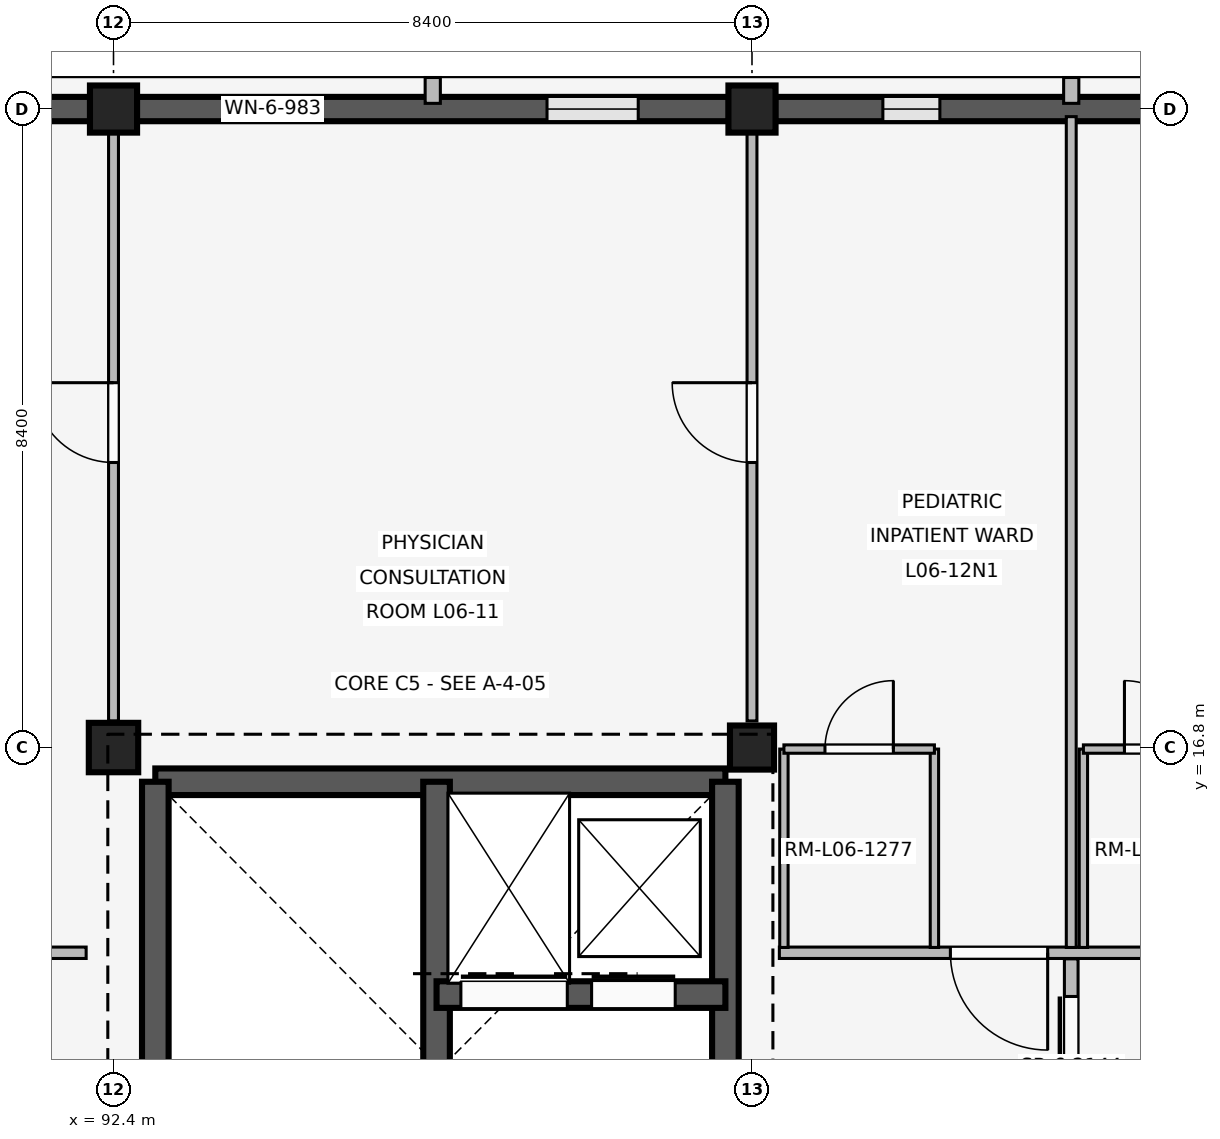
"""IFC4 building model, lengths in metres.
Left out: names, types, materials, properties, quantities, classifications, styles, units other than length and angle.
Written with IfcOpenShell. Run it as: python <this file> out.ifc"""

import sys

from ifc_helpers import new_model, si_unit, direction, frame, frame_2d, origin, origin_2d, place, context, subcontext, project, spatial, rectangle, extrude, element, fill, save


model = new_model("IFC4")
c1 = context("Model", 3, precision=1e-05, world=origin(), true_north=direction((0.0, 1.0)))
c2 = subcontext(c1, "Body", "Model", "MODEL_VIEW")
j1 = project(units=[si_unit("LENGTHUNIT", "METRE"), si_unit("PLANEANGLEUNIT", "RADIAN")], contexts=[c1])
p1 = place(None, origin())
s1 = spatial("IfcSite", under=j1, at=p1, CompositionType="ELEMENT")
p2 = place(p1, origin())
s2 = spatial("IfcBuilding", under=s1, at=p2, CompositionType="ELEMENT")
p3 = place(p2, frame((0.0, 0.0, 24.6)))
s3 = spatial("IfcBuildingStorey", under=s2, at=p3, CompositionType="ELEMENT", Elevation=24.6)
p4 = place(p3, frame((92.4, 16.8, 0.0), z_axis=(0.0, 0.0, 1.0), x_axis=(1.0, 0.0, 0.0)))
e1 = element("IfcColumn", 1, at=p4, inside=s3, PredefinedType="COLUMN", context=c2, shape_type="SweptSolid", body=[
    extrude(rectangle(XDim=0.65, YDim=0.65, at=origin_2d()), origin(), (0.0, 0.0, 1.0), 4.2),
])
p5 = place(p3, frame((92.4, 25.2, 0.0), z_axis=(0.0, 0.0, 1.0), x_axis=(1.0, 0.0, 0.0)))
e2 = element("IfcColumn", 2, at=p5, inside=s3, PredefinedType="COLUMN", context=c2, shape_type="SweptSolid", body=[
    extrude(rectangle(XDim=0.62, YDim=0.62, at=origin_2d()), origin(), (0.0, 0.0, 1.0), 4.2),
])
p6 = place(p3, frame((100.8, 16.8, 0.0), z_axis=(0.0, 0.0, 1.0), x_axis=(1.0, 0.0, 0.0)))
e3 = element("IfcColumn", 3, at=p6, inside=s3, PredefinedType="COLUMN", context=c2, shape_type="SweptSolid", body=[
    extrude(rectangle(XDim=0.58, YDim=0.58, at=origin_2d()), origin(), (0.0, 0.0, 1.0), 4.2),
])
p7 = place(p3, frame((100.8, 25.2, 0.0), z_axis=(0.0, 0.0, 1.0), x_axis=(1.0, 0.0, 0.0)))
e4 = element("IfcColumn", 4, at=p7, inside=s3, PredefinedType="COLUMN", context=c2, shape_type="SweptSolid", body=[
    extrude(rectangle(XDim=0.62, YDim=0.62, at=origin_2d()), origin(), (0.0, 0.0, 1.0), 4.2),
])
p8 = place(p3, frame((84.305, 25.2, 0.0), z_axis=(0.0, 0.0, 1.0), x_axis=(1.0, 0.0, 0.0)))
e5 = element("IfcWall", 5, at=p8, inside=s3, PredefinedType="SOLIDWALL", context=c2, shape_type="SweptSolid", body=[
    extrude(rectangle(XDim=7.79, YDim=0.32, at=frame_2d((3.895, 0.0))), origin(), (0.0, 0.0, 1.0), 3.34),
])
p9 = place(p8, frame((1.117, 0.0, 0.85)))
e6 = element("IfcOpeningElement", 6, at=p9, cuts=e5, PredefinedType="OPENING", context=c2, shape_type="SweptSolid", body=[
    extrude(rectangle(XDim=1.35, YDim=1.55, at=frame_2d((0.675, 0.775))), frame((0.0, 0.17, 0.0), z_axis=(0.0, -1.0, 0.0), x_axis=(1.0, 0.0, 0.0)), (0.0, 0.0, 1.0), 0.34),
])
p10 = place(p8, frame((5.323, 0.0, 0.85)))
e7 = element("IfcOpeningElement", 7, at=p10, cuts=e5, PredefinedType="OPENING", context=c2, shape_type="SweptSolid", body=[
    extrude(rectangle(XDim=1.35, YDim=1.55, at=frame_2d((0.675, 0.775))), frame((0.0, 0.17, 0.0), z_axis=(0.0, -1.0, 0.0), x_axis=(1.0, 0.0, 0.0)), (0.0, 0.0, 1.0), 0.34),
])
p11 = place(p3, frame((92.705, 25.2, 0.0), z_axis=(0.0, 0.0, 1.0), x_axis=(1.0, 0.0, 0.0)))
e8 = element("IfcWall", 8, at=p11, inside=s3, PredefinedType="SOLIDWALL", context=c2, shape_type="SweptSolid", body=[
    extrude(rectangle(XDim=7.79, YDim=0.32, at=frame_2d((3.895, 0.0))), origin(), (0.0, 0.0, 1.0), 3.34),
])
p12 = place(p11, frame((1.192, 0.0, 0.85)))
e9 = element("IfcOpeningElement", 9, at=p12, cuts=e8, PredefinedType="OPENING", context=c2, shape_type="SweptSolid", body=[
    extrude(rectangle(XDim=1.2, YDim=1.55, at=frame_2d((0.6, 0.775))), frame((0.0, 0.17, 0.0), z_axis=(0.0, -1.0, 0.0), x_axis=(1.0, 0.0, 0.0)), (0.0, 0.0, 1.0), 0.34),
])
p13 = place(p11, frame((5.398, 0.0, 0.85)))
e10 = element("IfcOpeningElement", 10, at=p13, cuts=e8, PredefinedType="OPENING", context=c2, shape_type="SweptSolid", body=[
    extrude(rectangle(XDim=1.2, YDim=1.55, at=frame_2d((0.6, 0.775))), frame((0.0, 0.17, 0.0), z_axis=(0.0, -1.0, 0.0), x_axis=(1.0, 0.0, 0.0)), (0.0, 0.0, 1.0), 0.34),
])
p14 = place(p3, frame((96.6, 25.275, 0.0), z_axis=(0.0, 0.0, 1.0), x_axis=(0.0, 1.0, 0.0)))
e11 = element("IfcWall", 11, at=p14, inside=s3, PredefinedType="ELEMENTEDWALL", context=c2, shape_type="SweptSolid", body=[
    extrude(rectangle(XDim=0.34, YDim=0.2, at=frame_2d((0.17, 0.0))), origin(), (0.0, 0.0, 1.0), 3.32),
])
p15 = place(p3, frame((101.105, 25.2, 0.0), z_axis=(0.0, 0.0, 1.0), x_axis=(1.0, 0.0, 0.0)))
e12 = element("IfcWall", 12, at=p15, inside=s3, PredefinedType="SOLIDWALL", context=c2, shape_type="SweptSolid", body=[
    extrude(rectangle(XDim=7.79, YDim=0.32, at=frame_2d((3.895, 0.0))), origin(), (0.0, 0.0, 1.0), 3.34),
])
p16 = place(p15, frame((1.417, 0.0, 0.85)))
e13 = element("IfcOpeningElement", 13, at=p16, cuts=e12, PredefinedType="OPENING", context=c2, shape_type="SweptSolid", body=[
    extrude(rectangle(XDim=0.75, YDim=1.85, at=frame_2d((0.375, 0.925))), frame((0.0, 0.17, 0.0), z_axis=(0.0, -1.0, 0.0), x_axis=(1.0, 0.0, 0.0)), (0.0, 0.0, 1.0), 0.34),
])
p17 = place(p15, frame((5.623, 0.0, 0.85)))
e14 = element("IfcOpeningElement", 14, at=p17, cuts=e12, PredefinedType="OPENING", context=c2, shape_type="SweptSolid", body=[
    extrude(rectangle(XDim=0.75, YDim=1.85, at=frame_2d((0.375, 0.925))), frame((0.0, 0.17, 0.0), z_axis=(0.0, -1.0, 0.0), x_axis=(1.0, 0.0, 0.0)), (0.0, 0.0, 1.0), 0.34),
])
p18 = place(p3, frame((105.0, 25.275, 0.0), z_axis=(0.0, 0.0, 1.0), x_axis=(0.0, 1.0, 0.0)))
e15 = element("IfcWall", 15, at=p18, inside=s3, PredefinedType="ELEMENTEDWALL", context=c2, shape_type="SweptSolid", body=[
    extrude(rectangle(XDim=0.34, YDim=0.2, at=frame_2d((0.17, 0.0))), origin(), (0.0, 0.0, 1.0), 3.32),
])
p19 = place(p3, frame((92.95, 16.35, 0.0), z_axis=(0.0, 0.0, 1.0), x_axis=(1.0, 0.0, 0.0)))
e16 = element("IfcWall", 16, at=p19, inside=s3, PredefinedType="SHEAR", context=c2, shape_type="SweptSolid", body=[
    extrude(rectangle(XDim=7.5, YDim=0.35, at=frame_2d((3.75, 0.0))), origin(), (0.0, 0.0, 1.0), 3.92),
])
p20 = place(p3, frame((92.95, 8.8, 0.0), z_axis=(0.0, 0.0, 1.0), x_axis=(0.0, 1.0, 0.0)))
e17 = element("IfcWall", 17, at=p20, inside=s3, PredefinedType="SHEAR", context=c2, shape_type="SweptSolid", body=[
    extrude(rectangle(XDim=7.55, YDim=0.35, at=frame_2d((3.775, 0.0))), origin(), (0.0, 0.0, 1.0), 3.92),
])
p21 = place(p20, frame((0.28, 0.0, 0.0)))
e18 = element("IfcOpeningElement", 18, at=p21, cuts=e17, PredefinedType="OPENING", context=c2, shape_type="SweptSolid", body=[
    extrude(rectangle(XDim=1.0, YDim=2.15, at=frame_2d((0.5, 1.075))), frame((0.0, 0.185, 0.0), z_axis=(0.0, -1.0, 0.0), x_axis=(1.0, 0.0, 0.0)), (0.0, 0.0, 1.0), 0.37),
])
p22 = place(p3, frame((100.45, 8.8, 0.0), z_axis=(0.0, 0.0, 1.0), x_axis=(0.0, 1.0, 0.0)))
e19 = element("IfcWall", 19, at=p22, inside=s3, PredefinedType="SHEAR", context=c2, shape_type="SweptSolid", body=[
    extrude(rectangle(XDim=7.55, YDim=0.35, at=frame_2d((3.775, 0.0))), origin(), (0.0, 0.0, 1.0), 3.92),
])
p23 = place(p22, frame((2.4, 0.0, 0.0)))
e20 = element("IfcOpeningElement", 20, at=p23, cuts=e19, PredefinedType="OPENING", context=c2, shape_type="SweptSolid", body=[
    extrude(rectangle(XDim=1.2, YDim=2.2, at=frame_2d((0.6, 1.1))), frame((0.0, 0.185, 0.0), z_axis=(0.0, -1.0, 0.0), x_axis=(1.0, 0.0, 0.0)), (0.0, 0.0, 1.0), 0.37),
])
p24 = place(p3, frame((96.65, 8.8, 0.0), z_axis=(0.0, 0.0, 1.0), x_axis=(0.0, 1.0, 0.0)))
e21 = element("IfcWall", 21, at=p24, inside=s3, PredefinedType="SHEAR", context=c2, shape_type="SweptSolid", body=[
    extrude(rectangle(XDim=7.55, YDim=0.35, at=frame_2d((3.775, 0.0))), origin(), (0.0, 0.0, 1.0), 3.92),
])
p25 = place(p24, frame((0.28, 0.0, 0.0)))
e22 = element("IfcOpeningElement", 22, at=p25, cuts=e21, PredefinedType="OPENING", context=c2, shape_type="SweptSolid", body=[
    extrude(rectangle(XDim=1.0, YDim=2.15, at=frame_2d((0.5, 1.075))), frame((0.0, 0.185, 0.0), z_axis=(0.0, -1.0, 0.0), x_axis=(1.0, 0.0, 0.0)), (0.0, 0.0, 1.0), 0.37),
])
p26 = place(p3, frame((96.65, 13.55, 0.0), z_axis=(0.0, 0.0, 1.0), x_axis=(1.0, 0.0, 0.0)))
e23 = element("IfcWall", 23, at=p26, inside=s3, PredefinedType="SHEAR", context=c2, shape_type="SweptSolid", body=[
    extrude(rectangle(XDim=3.8, YDim=0.35, at=frame_2d((1.9, 0.0))), origin(), (0.0, 0.0, 1.0), 3.92),
])
p27 = place(p26, frame((0.32, 0.0, 0.0)))
e24 = element("IfcOpeningElement", 24, at=p27, cuts=e23, PredefinedType="OPENING", context=c2, shape_type="SweptSolid", body=[
    extrude(rectangle(XDim=1.4, YDim=2.25, at=frame_2d((0.7, 1.125))), frame((0.0, 0.185, 0.0), z_axis=(0.0, -1.0, 0.0), x_axis=(1.0, 0.0, 0.0)), (0.0, 0.0, 1.0), 0.37),
])
p28 = place(p26, frame((2.04, 0.0, 0.0)))
e25 = element("IfcOpeningElement", 25, at=p28, cuts=e23, PredefinedType="OPENING", context=c2, shape_type="SweptSolid", body=[
    extrude(rectangle(XDim=1.1, YDim=2.15, at=frame_2d((0.55, 1.075))), frame((0.0, 0.185, 0.0), z_axis=(0.0, -1.0, 0.0), x_axis=(1.0, 0.0, 0.0)), (0.0, 0.0, 1.0), 0.37),
])
p29 = place(p3, frame((92.04, 14.1, 0.0), z_axis=(0.0, 0.0, 1.0), x_axis=(-1.0, 0.0, 0.0)))
e26 = element("IfcWall", 26, at=p29, inside=s3, PredefinedType="PARTITIONING", context=c2, shape_type="SweptSolid", body=[
    extrude(rectangle(XDim=7.96, YDim=0.15, at=frame_2d((3.98, 0.0))), origin(), (0.0, 0.0, 1.0), 3.32),
])
p30 = place(p29, frame((3.355, 0.0, 0.0)))
e27 = element("IfcOpeningElement", 27, at=p30, cuts=e26, PredefinedType="OPENING", context=c2, shape_type="SweptSolid", body=[
    extrude(rectangle(XDim=1.25, YDim=2.2, at=frame_2d((0.625, 1.1))), frame((0.0, 0.085, 0.0), z_axis=(0.0, -1.0, 0.0), x_axis=(1.0, 0.0, 0.0)), (0.0, 0.0, 1.0), 0.17),
])
p31 = place(p3, frame((92.4, 17.15, 0.0), z_axis=(0.0, 0.0, 1.0), x_axis=(0.0, 1.0, 0.0)))
e28 = element("IfcWall", 28, at=p31, inside=s3, PredefinedType="PARTITIONING", context=c2, shape_type="SweptSolid", body=[
    extrude(rectangle(XDim=7.91, YDim=0.13, at=frame_2d((3.955, 0.0))), origin(), (0.0, 0.0, 1.0), 3.32),
])
p32 = place(p31, frame((3.4, 0.0, 0.0)))
e29 = element("IfcOpeningElement", 29, at=p32, cuts=e28, PredefinedType="OPENING", context=c2, shape_type="SweptSolid", body=[
    extrude(rectangle(XDim=1.05, YDim=2.2, at=frame_2d((0.525, 1.1))), frame((0.0, 0.075, 0.0), z_axis=(0.0, -1.0, 0.0), x_axis=(1.0, 0.0, 0.0)), (0.0, 0.0, 1.0), 0.15),
])
p33 = place(p3, frame((100.8, 17.15, 0.0), z_axis=(0.0, 0.0, 1.0), x_axis=(0.0, 1.0, 0.0)))
e30 = element("IfcWall", 30, at=p33, inside=s3, PredefinedType="PARTITIONING", context=c2, shape_type="SweptSolid", body=[
    extrude(rectangle(XDim=7.91, YDim=0.13, at=frame_2d((3.955, 0.0))), origin(), (0.0, 0.0, 1.0), 3.32),
])
p34 = place(p33, frame((3.4, 0.0, 0.0)))
e31 = element("IfcOpeningElement", 31, at=p34, cuts=e30, PredefinedType="OPENING", context=c2, shape_type="SweptSolid", body=[
    extrude(rectangle(XDim=1.05, YDim=2.2, at=frame_2d((0.525, 1.1))), frame((0.0, 0.075, 0.0), z_axis=(0.0, -1.0, 0.0), x_axis=(1.0, 0.0, 0.0)), (0.0, 0.0, 1.0), 0.15),
])
p35 = place(p3, frame((109.12, 14.1, 0.0), z_axis=(0.0, 0.0, 1.0), x_axis=(-1.0, 0.0, 0.0)))
e32 = element("IfcWall", 32, at=p35, inside=s3, PredefinedType="PARTITIONING", context=c2, shape_type="SweptSolid", body=[
    extrude(rectangle(XDim=7.96, YDim=0.15, at=frame_2d((3.98, 0.0))), origin(), (0.0, 0.0, 1.0), 3.32),
])
p36 = place(p35, frame((0.73, 0.0, 0.0)))
e33 = element("IfcOpeningElement", 33, at=p36, cuts=e32, PredefinedType="OPENING", context=c2, shape_type="SweptSolid", body=[
    extrude(rectangle(XDim=1.28, YDim=2.2, at=frame_2d((0.64, 1.1))), frame((0.0, 0.085, 0.0), z_axis=(0.0, -1.0, 0.0), x_axis=(1.0, 0.0, 0.0)), (0.0, 0.0, 1.0), 0.17),
])
p37 = place(p35, frame((4.43, 0.0, 0.0)))
e34 = element("IfcOpeningElement", 34, at=p37, cuts=e32, PredefinedType="OPENING", context=c2, shape_type="SweptSolid", body=[
    extrude(rectangle(XDim=1.28, YDim=2.2, at=frame_2d((0.64, 1.1))), frame((0.0, 0.085, 0.0), z_axis=(0.0, -1.0, 0.0), x_axis=(1.0, 0.0, 0.0)), (0.0, 0.0, 1.0), 0.17),
])
p38 = place(p3, frame((105.0, 14.17, 0.0), z_axis=(0.0, 0.0, 1.0), x_axis=(0.0, 1.0, 0.0)))
e35 = element("IfcWall", 35, at=p38, inside=s3, PredefinedType="PARTITIONING", context=c2, shape_type="SweptSolid", body=[
    extrude(rectangle(XDim=10.93, YDim=0.13, at=frame_2d((5.465, 0.0))), origin(), (0.0, 0.0, 1.0), 3.32),
])
for number, where, z_axis, x_axis in (
    (36, (101.22, 14.17, 0.0), (0.0, 0.0, 1.0), (0.0, 1.0, 0.0)),
    (37, (103.2, 14.17, 0.0), (0.0, 0.0, 1.0), (0.0, 1.0, 0.0)),
):
    element("IfcWall", number, at=place(p3, frame(where, z_axis=z_axis, x_axis=x_axis)), inside=s3, PredefinedType="PARTITIONING", context=c2, shape_type="SweptSolid", body=[
        extrude(rectangle(XDim=2.61, YDim=0.11, at=frame_2d((1.305, 0.0))), origin(), (0.0, 0.0, 1.0), 3.32),
    ])
p39 = place(p3, frame((101.22, 16.78, 0.0), z_axis=(0.0, 0.0, 1.0), x_axis=(1.0, 0.0, 0.0)))
e38 = element("IfcWall", 38, at=p39, inside=s3, PredefinedType="PARTITIONING", context=c2, shape_type="SweptSolid", body=[
    extrude(rectangle(XDim=1.98, YDim=0.11, at=frame_2d((0.99, 0.0))), origin(), (0.0, 0.0, 1.0), 3.32),
])
p40 = place(p39, frame((0.54, 0.0, 0.0)))
e39 = element("IfcOpeningElement", 39, at=p40, cuts=e38, PredefinedType="OPENING", context=c2, shape_type="SweptSolid", body=[
    extrude(rectangle(XDim=0.9, YDim=2.1, at=frame_2d((0.45, 1.05))), frame((0.0, 0.065, 0.0), z_axis=(0.0, -1.0, 0.0), x_axis=(1.0, 0.0, 0.0)), (0.0, 0.0, 1.0), 0.13),
])
p41 = place(p3, frame((105.16, 14.17, 0.0), z_axis=(0.0, 0.0, 1.0), x_axis=(0.0, 1.0, 0.0)))
e40 = element("IfcWall", 40, at=p41, inside=s3, PredefinedType="PARTITIONING", context=c2, shape_type="SweptSolid", body=[
    extrude(rectangle(XDim=2.61, YDim=0.11, at=frame_2d((1.305, 0.0))), origin(), (0.0, 0.0, 1.0), 3.32),
])
p42 = place(p3, frame((105.16, 16.78, 0.0), z_axis=(0.0, 0.0, 1.0), x_axis=(1.0, 0.0, 0.0)))
e41 = element("IfcWall", 41, at=p42, inside=s3, PredefinedType="PARTITIONING", context=c2, shape_type="SweptSolid", body=[
    extrude(rectangle(XDim=1.98, YDim=0.11, at=frame_2d((0.99, 0.0))), origin(), (0.0, 0.0, 1.0), 3.32),
])
p43 = place(p42, frame((0.54, 0.0, 0.0)))
e42 = element("IfcOpeningElement", 42, at=p43, cuts=e41, PredefinedType="OPENING", context=c2, shape_type="SweptSolid", body=[
    extrude(rectangle(XDim=0.9, YDim=2.1, at=frame_2d((0.45, 1.05))), frame((0.0, 0.065, 0.0), z_axis=(0.0, -1.0, 0.0), x_axis=(1.0, 0.0, 0.0)), (0.0, 0.0, 1.0), 0.13),
])
p44 = place(p3, frame((105.0, 11.18, 0.0), z_axis=(0.0, 0.0, 1.0), x_axis=(0.0, 1.0, 0.0)))
e43 = element("IfcWall", 43, at=p44, inside=s3, PredefinedType="PARTITIONING", context=c2, shape_type="SweptSolid", body=[
    extrude(rectangle(XDim=2.84, YDim=0.18, at=frame_2d((1.42, 0.0))), origin(), (0.0, 0.0, 1.0), 3.32),
])
p45 = place(p44, frame((0.495, 0.0, 0.0)))
e44 = element("IfcOpeningElement", 44, at=p45, cuts=e43, PredefinedType="OPENING", context=c2, shape_type="SweptSolid", body=[
    extrude(rectangle(XDim=1.85, YDim=2.3, at=frame_2d((0.925, 1.15))), frame((0.0, 0.1, 0.0), z_axis=(0.0, -1.0, 0.0), x_axis=(1.0, 0.0, 0.0)), (0.0, 0.0, 1.0), 0.2),
])
p46 = place(p12, origin())
e45 = element("IfcWindow", 45, at=p46, inside=s3, PartitioningType="SINGLE_PANEL", PredefinedType="WINDOW", context=c2, shape_type="SweptSolid", body=[
    extrude(rectangle(XDim=1.2, YDim=1.55, at=frame_2d((0.6, 0.775))), frame((0.0, 0.03, 0.0), z_axis=(0.0, -1.0, 0.0), x_axis=(1.0, 0.0, 0.0)), (0.0, 0.0, 1.0), 0.06),
])
fill(e9, e45)
p47 = place(p13, origin())
e46 = element("IfcWindow", 46, at=p47, inside=s3, PartitioningType="SINGLE_PANEL", PredefinedType="WINDOW", context=c2, shape_type="SweptSolid", body=[
    extrude(rectangle(XDim=1.2, YDim=1.55, at=frame_2d((0.6, 0.775))), frame((0.0, 0.03, 0.0), z_axis=(0.0, -1.0, 0.0), x_axis=(1.0, 0.0, 0.0)), (0.0, 0.0, 1.0), 0.06),
])
fill(e10, e46)
p48 = place(p16, origin())
e47 = element("IfcWindow", 47, at=p48, inside=s3, PartitioningType="SINGLE_PANEL", PredefinedType="WINDOW", context=c2, shape_type="SweptSolid", body=[
    extrude(rectangle(XDim=0.75, YDim=1.85, at=frame_2d((0.375, 0.925))), frame((0.0, 0.03, 0.0), z_axis=(0.0, -1.0, 0.0), x_axis=(1.0, 0.0, 0.0)), (0.0, 0.0, 1.0), 0.06),
])
fill(e13, e47)
p49 = place(p27, origin())
e48 = element("IfcDoor", 48, at=p49, inside=s3, OperationType="SLIDING_TO_LEFT", PredefinedType="DOOR", context=c2, shape_type="SweptSolid", body=[
    extrude(rectangle(XDim=1.4, YDim=2.25, at=frame_2d((0.7, 1.125))), frame((0.0, 0.025, 0.0), z_axis=(0.0, -1.0, 0.0), x_axis=(1.0, 0.0, 0.0)), (0.0, 0.0, 1.0), 0.05),
])
fill(e24, e48)
p50 = place(p28, origin())
e49 = element("IfcDoor", 49, at=p50, inside=s3, OperationType="SLIDING_TO_LEFT", PredefinedType="DOOR", context=c2, shape_type="SweptSolid", body=[
    extrude(rectangle(XDim=1.1, YDim=2.15, at=frame_2d((0.55, 1.075))), frame((0.0, 0.025, 0.0), z_axis=(0.0, -1.0, 0.0), x_axis=(1.0, 0.0, 0.0)), (0.0, 0.0, 1.0), 0.05),
])
fill(e25, e49)
p51 = place(p32, origin())
e50 = element("IfcDoor", 50, at=p51, inside=s3, OperationType="SINGLE_SWING_RIGHT", PredefinedType="DOOR", context=c2, shape_type="SweptSolid", body=[
    extrude(rectangle(XDim=1.05, YDim=2.2, at=frame_2d((0.525, 1.1))), frame((0.0, 0.025, 0.0), z_axis=(0.0, -1.0, 0.0), x_axis=(1.0, 0.0, 0.0)), (0.0, 0.0, 1.0), 0.05),
])
fill(e29, e50)
p52 = place(p34, origin())
e51 = element("IfcDoor", 51, at=p52, inside=s3, OperationType="SINGLE_SWING_RIGHT", PredefinedType="DOOR", context=c2, shape_type="SweptSolid", body=[
    extrude(rectangle(XDim=1.05, YDim=2.2, at=frame_2d((0.525, 1.1))), frame((0.0, 0.025, 0.0), z_axis=(0.0, -1.0, 0.0), x_axis=(1.0, 0.0, 0.0)), (0.0, 0.0, 1.0), 0.05),
])
fill(e31, e51)
p53 = place(p37, origin())
e52 = element("IfcDoor", 52, at=p53, inside=s3, OperationType="SINGLE_SWING_LEFT", PredefinedType="DOOR", context=c2, shape_type="SweptSolid", body=[
    extrude(rectangle(XDim=1.28, YDim=2.2, at=frame_2d((0.64, 1.1))), frame((0.0, 0.025, 0.0), z_axis=(0.0, -1.0, 0.0), x_axis=(1.0, 0.0, 0.0)), (0.0, 0.0, 1.0), 0.05),
])
fill(e34, e52)
p54 = place(p40, origin())
e53 = element("IfcDoor", 53, at=p54, inside=s3, OperationType="SINGLE_SWING_RIGHT", PredefinedType="DOOR", context=c2, shape_type="SweptSolid", body=[
    extrude(rectangle(XDim=0.9, YDim=2.1, at=frame_2d((0.45, 1.05))), frame((0.0, 0.025, 0.0), z_axis=(0.0, -1.0, 0.0), x_axis=(1.0, 0.0, 0.0)), (0.0, 0.0, 1.0), 0.05),
])
fill(e39, e53)
p55 = place(p43, origin())
e54 = element("IfcDoor", 54, at=p55, inside=s3, OperationType="SINGLE_SWING_LEFT", PredefinedType="DOOR", context=c2, shape_type="SweptSolid", body=[
    extrude(rectangle(XDim=0.9, YDim=2.1, at=frame_2d((0.45, 1.05))), frame((0.0, 0.025, 0.0), z_axis=(0.0, -1.0, 0.0), x_axis=(1.0, 0.0, 0.0)), (0.0, 0.0, 1.0), 0.05),
])
fill(e42, e54)
p56 = place(p45, origin())
e55 = element("IfcDoor", 55, at=p56, inside=s3, OperationType="SLIDING_TO_LEFT", PredefinedType="DOOR", context=c2, shape_type="SweptSolid", body=[
    extrude(rectangle(XDim=1.85, YDim=2.3, at=frame_2d((0.925, 1.15))), frame((0.0, 0.025, 0.0), z_axis=(0.0, -1.0, 0.0), x_axis=(1.0, 0.0, 0.0)), (0.0, 0.0, 1.0), 0.05),
])
fill(e44, e55)
save(model, sys.argv[1])
